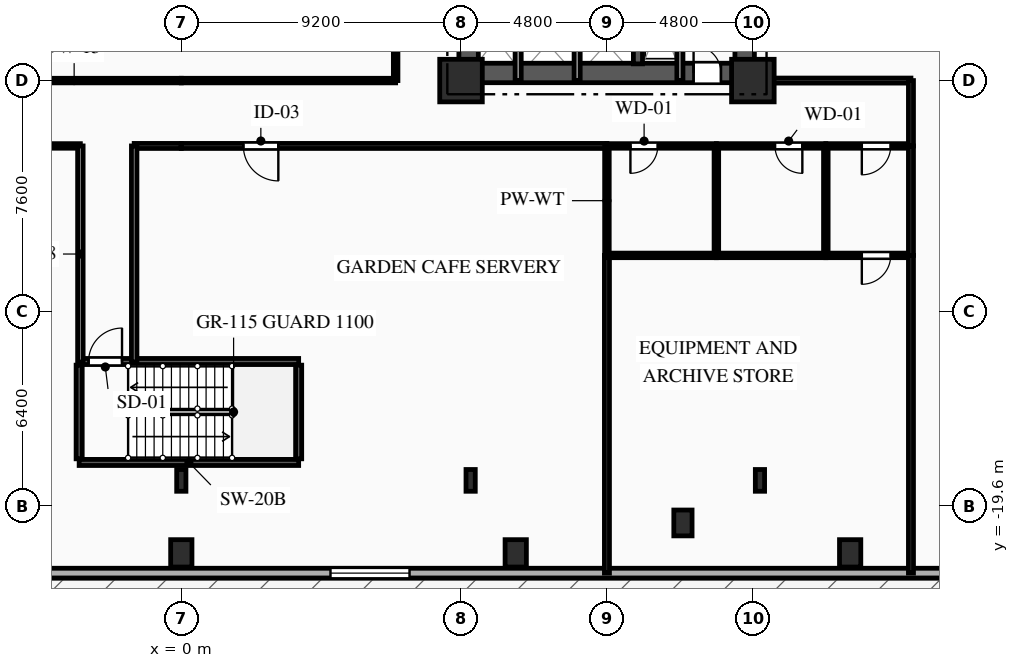
"""IFC4 building model, lengths in metres.
Left out: names, types, materials, properties, quantities, classifications, styles, units other than length and angle.
Written with IfcOpenShell. Run it as: python <this file> out.ifc"""

import sys

from ifc_helpers import new_model, si_unit, direction, frame, frame_2d, origin, origin_2d, place, context, subcontext, project, spatial, rectangle, i_section, extrude, element, fill, save


model = new_model("IFC4")
c1 = context("Model", 3, precision=1e-05, world=origin(), true_north=direction((0.0, 1.0)))
c2 = subcontext(c1, "Body", "Model", "MODEL_VIEW")
j1 = project(units=[si_unit("LENGTHUNIT", "METRE"), si_unit("PLANEANGLEUNIT", "RADIAN")], contexts=[c1])
p1 = place(None, origin())
s1 = spatial("IfcSite", under=j1, at=p1, CompositionType="ELEMENT")
p2 = place(p1, origin())
s2 = spatial("IfcBuilding", under=s1, at=p2, CompositionType="ELEMENT")
p3 = place(p2, frame((0.0, 0.0, 13.5)))
s3 = spatial("IfcBuildingStorey", under=s2, at=p3, CompositionType="ELEMENT", Elevation=13.5)
for number, where, z_axis, x_axis in (
    (1, (9.2, -5.6, 0.0), (0.0, 0.0, 1.0), (1.0, 0.0, 0.0)),
    (2, (18.8, -5.6, 0.0), (0.0, 0.0, 1.0), (1.0, 0.0, 0.0)),
):
    element("IfcColumn", number, at=place(p3, frame(where, z_axis=z_axis, x_axis=x_axis)), inside=s3, PredefinedType="COLUMN", context=c2, shape_type="SweptSolid", body=[
        extrude(rectangle(XDim=1.4, YDim=1.4, at=origin_2d()), origin(), (0.0, 0.0, 1.0), 4.5),
    ])
for number, where, z_axis, x_axis in (
    (3, (0.0, -21.15, 0.0), (0.0, 0.0, 1.0), (1.0, 0.0, 0.0)),
    (4, (11.0, -21.15, 0.0), (0.0, 0.0, 1.0), (1.0, 0.0, 0.0)),
    (5, (22.0, -21.15, 0.0), (0.0, 0.0, 1.0), (1.0, 0.0, 0.0)),
):
    element("IfcColumn", number, at=place(p3, frame(where, z_axis=z_axis, x_axis=x_axis)), inside=s3, PredefinedType="COLUMN", context=c2, shape_type="SweptSolid", body=[
        extrude(rectangle(XDim=0.7, YDim=0.9, at=origin_2d()), origin(), (0.0, 0.0, 1.0), 4.5),
    ])
p4 = place(p3, frame((16.5, -20.15, 0.0), z_axis=(0.0, 0.0, 1.0), x_axis=(1.0, 0.0, 0.0)))
e6 = element("IfcColumn", 6, at=p4, inside=s3, PredefinedType="PILASTER", context=c2, shape_type="SweptSolid", body=[
    extrude(rectangle(XDim=0.6, YDim=0.85, at=origin_2d()), origin(), (0.0, 0.0, 1.0), 4.5),
])
for number, where, z_axis, x_axis in (
    (7, (0.0, -18.75, 0.0), (0.0, 0.0, 1.0), (1.0, 0.0, 0.0)),
    (8, (9.517, -18.75, 0.0), (0.0, 0.0, 1.0), (1.0, 0.0, 0.0)),
    (9, (19.033, -18.75, 0.0), (0.0, 0.0, 1.0), (1.0, 0.0, 0.0)),
):
    element("IfcColumn", number, at=place(p3, frame(where, z_axis=z_axis, x_axis=x_axis)), inside=s3, PredefinedType="COLUMN", context=c2, shape_type="SweptSolid", body=[
        extrude(i_section(OverallWidth=0.304, OverallDepth=0.716, WebThickness=0.021, FlangeThickness=0.04, FilletRadius=0.027, at=origin_2d()), origin(), (0.0, 0.0, 1.0), 4.5),
    ])
p5 = place(p3, frame((36.8, -21.8, 0.0), z_axis=(0.0, 0.0, 1.0), x_axis=(-1.0, 0.0, 0.0)))
e10 = element("IfcWall", 10, at=p5, inside=s3, PredefinedType="SOLIDWALL", context=c2, shape_type="SweptSolid", body=[
    extrude(rectangle(XDim=73.6, YDim=0.32, at=frame_2d((36.8, 0.0))), origin(), (0.0, 0.0, 1.0), 4.17),
])
p6 = place(p5, frame((0.75, 0.0, 0.0)))
e11 = element("IfcOpeningElement", 11, at=p6, cuts=e10, PredefinedType="OPENING", context=c2, shape_type="SweptSolid", body=[
    extrude(rectangle(XDim=1.5, YDim=2.2, at=frame_2d((0.75, 1.1))), frame((0.0, 0.17, 0.0), z_axis=(0.0, -1.0, 0.0), x_axis=(1.0, 0.0, 0.0)), (0.0, 0.0, 1.0), 0.34),
])
p7 = place(p5, frame((5.347, 0.0, 0.85)))
e12 = element("IfcOpeningElement", 12, at=p7, cuts=e10, PredefinedType="OPENING", context=c2, shape_type="SweptSolid", body=[
    extrude(rectangle(XDim=2.6, YDim=2.4, at=frame_2d((1.3, 1.2))), frame((0.0, 0.17, 0.0), z_axis=(0.0, -1.0, 0.0), x_axis=(1.0, 0.0, 0.0)), (0.0, 0.0, 1.0), 0.34),
])
p8 = place(p5, frame((29.293, 0.0, 0.85)))
e13 = element("IfcOpeningElement", 13, at=p8, cuts=e10, PredefinedType="OPENING", context=c2, shape_type="SweptSolid", body=[
    extrude(rectangle(XDim=2.6, YDim=2.4, at=frame_2d((1.3, 1.2))), frame((0.0, 0.17, 0.0), z_axis=(0.0, -1.0, 0.0), x_axis=(1.0, 0.0, 0.0)), (0.0, 0.0, 1.0), 0.34),
])
p9 = place(p5, frame((49.195, 0.0, 0.85)))
e14 = element("IfcOpeningElement", 14, at=p9, cuts=e10, PredefinedType="OPENING", context=c2, shape_type="SweptSolid", body=[
    extrude(rectangle(XDim=2.6, YDim=2.4, at=frame_2d((1.3, 1.2))), frame((0.0, 0.17, 0.0), z_axis=(0.0, -1.0, 0.0), x_axis=(1.0, 0.0, 0.0)), (0.0, 0.0, 1.0), 0.34),
])
p10 = place(p5, frame((65.733, 0.0, 0.85)))
e15 = element("IfcOpeningElement", 15, at=p10, cuts=e10, PredefinedType="OPENING", context=c2, shape_type="SweptSolid", body=[
    extrude(rectangle(XDim=2.6, YDim=2.4, at=frame_2d((1.3, 1.2))), frame((0.0, 0.17, 0.0), z_axis=(0.0, -1.0, 0.0), x_axis=(1.0, 0.0, 0.0)), (0.0, 0.0, 1.0), 0.34),
])
p11 = place(p3, frame((9.2, -5.35, 0.0), z_axis=(0.0, 0.0, 1.0), x_axis=(1.0, 0.0, 0.0)))
e16 = element("IfcWall", 16, at=p11, inside=s3, PredefinedType="SHEAR", context=c2, shape_type="SweptSolid", body=[
    extrude(rectangle(XDim=9.6, YDim=0.64, at=frame_2d((4.8, 0.0))), origin(), (0.0, 0.0, 1.0), 4.17),
])
p12 = place(p11, frame((7.65, 0.0, 0.0)))
e17 = element("IfcOpeningElement", 17, at=p12, cuts=e16, PredefinedType="OPENING", context=c2, shape_type="SweptSolid", body=[
    extrude(rectangle(XDim=0.9, YDim=2.1, at=frame_2d((0.45, 1.05))), frame((0.0, 0.33, 0.0), z_axis=(0.0, -1.0, 0.0), x_axis=(1.0, 0.0, 0.0)), (0.0, 0.0, 1.0), 0.66),
])
p13 = place(p3, frame((9.45, -5.05, 0.0), z_axis=(0.0, 0.0, 1.0), x_axis=(0.0, 1.0, 0.0)))
e18 = element("IfcWall", 18, at=p13, inside=s3, PredefinedType="SHEAR", context=c2, shape_type="SweptSolid", body=[
    extrude(rectangle(XDim=10.1, YDim=0.64, at=frame_2d((5.05, 0.0))), origin(), (0.0, 0.0, 1.0), 4.17),
])
p14 = place(p13, frame((7.15, 0.0, 0.0)))
e19 = element("IfcOpeningElement", 19, at=p14, cuts=e18, PredefinedType="OPENING", context=c2, shape_type="SweptSolid", body=[
    extrude(rectangle(XDim=0.9, YDim=2.1, at=frame_2d((0.45, 1.05))), frame((0.0, 0.33, 0.0), z_axis=(0.0, -1.0, 0.0), x_axis=(1.0, 0.0, 0.0)), (0.0, 0.0, 1.0), 0.66),
])
p15 = place(p13, frame((2.4, 0.0, 0.0)))
e20 = element("IfcOpeningElement", 20, at=p15, cuts=e18, PredefinedType="OPENING", context=c2, shape_type="SweptSolid", body=[
    extrude(rectangle(XDim=1.2, YDim=2.15, at=frame_2d((0.6, 1.075))), frame((0.0, 0.33, 0.0), z_axis=(0.0, -1.0, 0.0), x_axis=(1.0, 0.0, 0.0)), (0.0, 0.0, 1.0), 0.66),
])
p16 = place(p3, frame((18.53, -5.05, 0.0), z_axis=(0.0, 0.0, 1.0), x_axis=(0.0, 1.0, 0.0)))
e21 = element("IfcWall", 21, at=p16, inside=s3, PredefinedType="SHEAR", context=c2, shape_type="SweptSolid", body=[
    extrude(rectangle(XDim=10.1, YDim=0.64, at=frame_2d((5.05, 0.0))), origin(), (0.0, 0.0, 1.0), 4.17),
])
p17 = place(p3, frame((15.02, -5.05, 0.0), z_axis=(0.0, 0.0, 1.0), x_axis=(0.0, 1.0, 0.0)))
e22 = element("IfcWall", 22, at=p17, inside=s3, PredefinedType="SHEAR", context=c2, shape_type="SweptSolid", body=[
    extrude(rectangle(XDim=10.1, YDim=0.3, at=frame_2d((5.05, 0.0))), origin(), (0.0, 0.0, 1.0), 4.17),
])
p18 = place(p3, frame((-3.36, -14.84, 0.0), z_axis=(0.0, 0.0, 1.0), x_axis=(1.0, 0.0, 0.0)))
e23 = element("IfcWall", 23, at=p18, inside=s3, PredefinedType="SHEAR", context=c2, shape_type="SweptSolid", body=[
    extrude(rectangle(XDim=7.22, YDim=0.2, at=frame_2d((3.61, 0.0))), origin(), (0.0, 0.0, 1.0), 4.17),
])
p19 = place(p18, frame((0.31, 0.0, 0.0)))
e24 = element("IfcOpeningElement", 24, at=p19, cuts=e23, PredefinedType="OPENING", context=c2, shape_type="SweptSolid", body=[
    extrude(rectangle(XDim=1.1, YDim=2.15, at=frame_2d((0.55, 1.075))), frame((0.0, 0.11, 0.0), z_axis=(0.0, -1.0, 0.0), x_axis=(1.0, 0.0, 0.0)), (0.0, 0.0, 1.0), 0.22),
])
p20 = place(p3, frame((-3.36, -18.16, 0.0), z_axis=(0.0, 0.0, 1.0), x_axis=(1.0, 0.0, 0.0)))
e25 = element("IfcWall", 25, at=p20, inside=s3, PredefinedType="SHEAR", context=c2, shape_type="SweptSolid", body=[
    extrude(rectangle(XDim=7.22, YDim=0.2, at=frame_2d((3.61, 0.0))), origin(), (0.0, 0.0, 1.0), 4.17),
])
for number, where, z_axis, x_axis in (
    (26, (-3.36, -18.04, 0.0), (0.0, 0.0, 1.0), (0.0, 1.0, 0.0)),
    (27, (3.86, -18.04, 0.0), (0.0, 0.0, 1.0), (0.0, 1.0, 0.0)),
):
    element("IfcWall", number, at=place(p3, frame(where, z_axis=z_axis, x_axis=x_axis)), inside=s3, PredefinedType="SHEAR", context=c2, shape_type="SweptSolid", body=[
        extrude(rectangle(XDim=3.08, YDim=0.2, at=frame_2d((1.54, 0.0))), origin(), (0.0, 0.0, 1.0), 4.17),
    ])
p21 = place(p3, frame((16.4, -2.11, 0.0), z_axis=(0.0, 0.0, 1.0), x_axis=(0.0, -1.0, 0.0)))
e28 = element("IfcWall", 28, at=p21, inside=s3, PredefinedType="PARTITIONING", context=c2, shape_type="SweptSolid", body=[
    extrude(rectangle(XDim=3.49, YDim=0.2, at=frame_2d((1.745, 0.0))), origin(), (0.0, 0.0, 1.0), 4.17),
])
for number, where, z_axis, x_axis in (
    (29, (11.08, -5.6, 0.0), (0.0, 0.0, 1.0), (0.0, 1.0, 0.0)),
    (30, (13.02, -5.6, 0.0), (0.0, 0.0, 1.0), (0.0, 1.0, 0.0)),
):
    element("IfcWall", number, at=place(p3, frame(where, z_axis=z_axis, x_axis=x_axis)), inside=s3, PredefinedType="PARTITIONING", context=c2, shape_type="SweptSolid", body=[
        extrude(rectangle(XDim=2.25, YDim=0.2, at=frame_2d((1.125, 0.0))), origin(), (0.0, 0.0, 1.0), 4.17),
    ])
p22 = place(p3, frame((-3.32, -7.75, 0.0), z_axis=(0.0, 0.0, 1.0), x_axis=(-1.0, 0.0, 0.0)))
e31 = element("IfcWall", 31, at=p22, inside=s3, PredefinedType="PARTITIONING", context=c2, shape_type="SweptSolid", body=[
    extrude(rectangle(XDim=20.68, YDim=0.15, at=frame_2d((10.34, 0.0))), origin(), (0.0, 0.0, 1.0), 4.17),
])
p23 = place(p22, frame((9.815, 0.0, 0.0)))
e32 = element("IfcOpeningElement", 32, at=p23, cuts=e31, PredefinedType="OPENING", context=c2, shape_type="SweptSolid", body=[
    extrude(rectangle(XDim=1.05, YDim=2.15, at=frame_2d((0.525, 1.075))), frame((0.0, 0.085, 0.0), z_axis=(0.0, -1.0, 0.0), x_axis=(1.0, 0.0, 0.0)), (0.0, 0.0, 1.0), 0.17),
])
p24 = place(p3, frame((0.0, -7.75, 0.0), z_axis=(0.0, 0.0, 1.0), x_axis=(-1.0, 0.0, 0.0)))
e33 = element("IfcWall", 33, at=p24, inside=s3, PredefinedType="PARTITIONING", context=c2, shape_type="SweptSolid", body=[
    extrude(rectangle(XDim=1.55, YDim=0.165, at=frame_2d((0.775, 0.0))), origin(), (0.0, 0.0, 1.0), 4.17),
])
p25 = place(p3, frame((-7.05, -5.6, 0.0), z_axis=(0.0, 0.0, 1.0), x_axis=(1.0, 0.0, 0.0)))
e34 = element("IfcWall", 34, at=p25, inside=s3, PredefinedType="PARTITIONING", context=c2, shape_type="SweptSolid", body=[
    extrude(rectangle(XDim=7.05, YDim=0.15, at=frame_2d((3.525, 0.0))), origin(), (0.0, 0.0, 1.0), 3.655),
])
p26 = place(p3, frame((14.0, -7.75, 0.0), z_axis=(0.0, 0.0, 1.0), x_axis=(-1.0, 0.0, 0.0)))
e35 = element("IfcWall", 35, at=p26, inside=s3, PredefinedType="PARTITIONING", context=c2, shape_type="SweptSolid", body=[
    extrude(rectangle(XDim=14.0, YDim=0.165, at=frame_2d((7.0, 0.0))), origin(), (0.0, 0.0, 1.0), 4.17),
])
p27 = place(p26, frame((10.809, 0.0, 0.0)))
e36 = element("IfcOpeningElement", 36, at=p27, cuts=e35, PredefinedType="OPENING", context=c2, shape_type="SweptSolid", body=[
    extrude(rectangle(XDim=1.15, YDim=2.15, at=frame_2d((0.575, 1.075))), frame((0.0, 0.093, 0.0), z_axis=(0.0, -1.0, 0.0), x_axis=(1.0, 0.0, 0.0)), (0.0, 0.0, 1.0), 0.185),
])
p28 = place(p3, frame((17.6, -7.75, 0.0), z_axis=(0.0, 0.0, 1.0), x_axis=(-1.0, 0.0, 0.0)))
e37 = element("IfcWall", 37, at=p28, inside=s3, PredefinedType="PLUMBINGWALL", context=c2, shape_type="SweptSolid", body=[
    extrude(rectangle(XDim=3.6, YDim=0.15, at=frame_2d((1.8, 0.0))), origin(), (0.0, 0.0, 1.0), 4.17),
])
p29 = place(p28, frame((1.927, 0.0, 0.0)))
e38 = element("IfcOpeningElement", 38, at=p29, cuts=e37, PredefinedType="OPENING", context=c2, shape_type="SweptSolid", body=[
    extrude(rectangle(XDim=0.9, YDim=2.1, at=frame_2d((0.45, 1.05))), frame((0.0, 0.085, 0.0), z_axis=(0.0, -1.0, 0.0), x_axis=(1.0, 0.0, 0.0)), (0.0, 0.0, 1.0), 0.17),
])
p30 = place(p3, frame((21.2, -7.75, 0.0), z_axis=(0.0, 0.0, 1.0), x_axis=(-1.0, 0.0, 0.0)))
e39 = element("IfcWall", 39, at=p30, inside=s3, PredefinedType="PLUMBINGWALL", context=c2, shape_type="SweptSolid", body=[
    extrude(rectangle(XDim=3.6, YDim=0.15, at=frame_2d((1.8, 0.0))), origin(), (0.0, 0.0, 1.0), 4.17),
])
p31 = place(p30, frame((0.772, 0.0, 0.0)))
e40 = element("IfcOpeningElement", 40, at=p31, cuts=e39, PredefinedType="OPENING", context=c2, shape_type="SweptSolid", body=[
    extrude(rectangle(XDim=0.9, YDim=2.1, at=frame_2d((0.45, 1.05))), frame((0.0, 0.085, 0.0), z_axis=(0.0, -1.0, 0.0), x_axis=(1.0, 0.0, 0.0)), (0.0, 0.0, 1.0), 0.17),
])
p32 = place(p3, frame((24.0, -7.75, 0.0), z_axis=(0.0, 0.0, 1.0), x_axis=(-1.0, 0.0, 0.0)))
e41 = element("IfcWall", 41, at=p32, inside=s3, PredefinedType="PARTITIONING", context=c2, shape_type="SweptSolid", body=[
    extrude(rectangle(XDim=2.8, YDim=0.15, at=frame_2d((1.4, 0.0))), origin(), (0.0, 0.0, 1.0), 4.17),
])
p33 = place(p32, frame((0.666, 0.0, 0.0)))
e42 = element("IfcOpeningElement", 42, at=p33, cuts=e41, PredefinedType="OPENING", context=c2, shape_type="SweptSolid", body=[
    extrude(rectangle(XDim=0.95, YDim=2.1, at=frame_2d((0.475, 1.05))), frame((0.0, 0.085, 0.0), z_axis=(0.0, -1.0, 0.0), x_axis=(1.0, 0.0, 0.0)), (0.0, 0.0, 1.0), 0.17),
])
p34 = place(p3, frame((0.0, -5.6, 0.0), z_axis=(0.0, 0.0, 1.0), x_axis=(1.0, 0.0, 0.0)))
e43 = element("IfcWall", 43, at=p34, inside=s3, PredefinedType="PARTITIONING", context=c2, shape_type="SweptSolid", body=[
    extrude(rectangle(XDim=7.05, YDim=0.15, at=frame_2d((3.525, 0.0))), origin(), (0.0, 0.0, 1.0), 3.655),
])
p35 = place(p3, frame((18.8, -5.6, 0.0), z_axis=(0.0, 0.0, 1.0), x_axis=(1.0, 0.0, 0.0)))
e44 = element("IfcWall", 44, at=p35, inside=s3, PredefinedType="PARTITIONING", context=c2, shape_type="SweptSolid", body=[
    extrude(rectangle(XDim=5.2, YDim=0.165, at=frame_2d((2.6, 0.0))), origin(), (0.0, 0.0, 1.0), 4.17),
])
p36 = place(p3, frame((24.0, -5.6, 0.0), z_axis=(0.0, 0.0, 1.0), x_axis=(0.0, -1.0, 0.0)))
e45 = element("IfcWall", 45, at=p36, inside=s3, PredefinedType="PARTITIONING", context=c2, shape_type="SweptSolid", body=[
    extrude(rectangle(XDim=2.15, YDim=0.165, at=frame_2d((1.075, 0.0))), origin(), (0.0, 0.0, 1.0), 4.17),
])
p37 = place(p3, frame((7.05, -5.6, 0.0), z_axis=(0.0, 0.0, 1.0), x_axis=(0.0, 1.0, 0.0)))
e46 = element("IfcWall", 46, at=p37, inside=s3, PredefinedType="PARTITIONING", context=c2, shape_type="SweptSolid", body=[
    extrude(rectangle(XDim=14.1, YDim=0.15, at=frame_2d((7.05, 0.0))), origin(), (0.0, 0.0, 1.0), 4.17),
])
for number, where, z_axis, x_axis in (
    (47, (-3.32, -14.86, 0.0), (0.0, 0.0, 1.0), (0.0, 1.0, 0.0)),
    (48, (-1.55, -7.75, 0.0), (0.0, 0.0, 1.0), (0.0, -1.0, 0.0)),
):
    element("IfcWall", number, at=place(p3, frame(where, z_axis=z_axis, x_axis=x_axis)), inside=s3, PredefinedType="PARTITIONING", context=c2, shape_type="SweptSolid", body=[
        extrude(rectangle(XDim=7.11, YDim=0.18, at=frame_2d((3.555, 0.0))), origin(), (0.0, 0.0, 1.0), 4.17),
    ])
p38 = place(p3, frame((14.0, -7.75, 0.0), z_axis=(0.0, 0.0, 1.0), x_axis=(0.0, -1.0, 0.0)))
e49 = element("IfcWall", 49, at=p38, inside=s3, PredefinedType="PLUMBINGWALL", context=c2, shape_type="SweptSolid", body=[
    extrude(rectangle(XDim=3.6, YDim=0.15, at=frame_2d((1.8, 0.0))), origin(), (0.0, 0.0, 1.0), 4.17),
])
p39 = place(p3, frame((14.0, -11.35, 0.0), z_axis=(0.0, 0.0, 1.0), x_axis=(0.0, -1.0, 0.0)))
e50 = element("IfcWall", 50, at=p39, inside=s3, PredefinedType="PARTITIONING", context=c2, shape_type="SweptSolid", body=[
    extrude(rectangle(XDim=10.45, YDim=0.165, at=frame_2d((5.225, 0.0))), origin(), (0.0, 0.0, 1.0), 4.17),
])
for number, where, z_axis, x_axis in (
    (51, (17.6, -7.75, 0.0), (0.0, 0.0, 1.0), (0.0, -1.0, 0.0)),
    (52, (17.6, -11.35, 0.0), (0.0, 0.0, 1.0), (-1.0, 0.0, 0.0)),
    (53, (21.2, -7.75, 0.0), (0.0, 0.0, 1.0), (0.0, -1.0, 0.0)),
):
    element("IfcWall", number, at=place(p3, frame(where, z_axis=z_axis, x_axis=x_axis)), inside=s3, PredefinedType="PLUMBINGWALL", context=c2, shape_type="SweptSolid", body=[
        extrude(rectangle(XDim=3.6, YDim=0.15, at=frame_2d((1.8, 0.0))), origin(), (0.0, 0.0, 1.0), 4.17),
    ])
p40 = place(p3, frame((21.2, -11.35, 0.0), z_axis=(0.0, 0.0, 1.0), x_axis=(-1.0, 0.0, 0.0)))
e54 = element("IfcWall", 54, at=p40, inside=s3, PredefinedType="PLUMBINGWALL", context=c2, shape_type="SweptSolid", body=[
    extrude(rectangle(XDim=3.6, YDim=0.15, at=frame_2d((1.8, 0.0))), origin(), (0.0, 0.0, 1.0), 4.17),
])
p41 = place(p3, frame((24.0, -11.35, 0.0), z_axis=(0.0, 0.0, 1.0), x_axis=(-1.0, 0.0, 0.0)))
e55 = element("IfcWall", 55, at=p41, inside=s3, PredefinedType="PARTITIONING", context=c2, shape_type="SweptSolid", body=[
    extrude(rectangle(XDim=2.8, YDim=0.15, at=frame_2d((1.4, 0.0))), origin(), (0.0, 0.0, 1.0), 4.17),
])
p42 = place(p41, frame((0.666, 0.0, 0.0)))
e56 = element("IfcOpeningElement", 56, at=p42, cuts=e55, PredefinedType="OPENING", context=c2, shape_type="SweptSolid", body=[
    extrude(rectangle(XDim=0.95, YDim=2.1, at=frame_2d((0.475, 1.05))), frame((0.0, 0.085, 0.0), z_axis=(0.0, -1.0, 0.0), x_axis=(1.0, 0.0, 0.0)), (0.0, 0.0, 1.0), 0.17),
])
p43 = place(p3, frame((24.0, -7.75, 0.0), z_axis=(0.0, 0.0, 1.0), x_axis=(0.0, -1.0, 0.0)))
e57 = element("IfcWall", 57, at=p43, inside=s3, PredefinedType="PARTITIONING", context=c2, shape_type="SweptSolid", body=[
    extrude(rectangle(XDim=3.6, YDim=0.165, at=frame_2d((1.8, 0.0))), origin(), (0.0, 0.0, 1.0), 4.17),
])
p44 = place(p3, frame((24.0, -11.35, 0.0), z_axis=(0.0, 0.0, 1.0), x_axis=(0.0, -1.0, 0.0)))
e58 = element("IfcWall", 58, at=p44, inside=s3, PredefinedType="PARTITIONING", context=c2, shape_type="SweptSolid", body=[
    extrude(rectangle(XDim=10.45, YDim=0.165, at=frame_2d((5.225, 0.0))), origin(), (0.0, 0.0, 1.0), 4.17),
])
p45 = place(p8, origin())
e59 = element("IfcWindow", 59, at=p45, inside=s3, PartitioningType="SINGLE_PANEL", PredefinedType="WINDOW", context=c2, shape_type="SweptSolid", body=[
    extrude(rectangle(XDim=2.6, YDim=2.4, at=frame_2d((1.3, 1.2))), frame((0.0, 0.03, 0.0), z_axis=(0.0, -1.0, 0.0), x_axis=(1.0, 0.0, 0.0)), (0.0, 0.0, 1.0), 0.06),
])
fill(e13, e59)
p46 = place(p12, origin())
e60 = element("IfcDoor", 60, at=p46, inside=s3, OperationType="SINGLE_SWING_LEFT", PredefinedType="DOOR", context=c2, shape_type="SweptSolid", body=[
    extrude(rectangle(XDim=0.9, YDim=2.1, at=frame_2d((0.45, 1.05))), frame((0.0, 0.025, 0.0), z_axis=(0.0, -1.0, 0.0), x_axis=(1.0, 0.0, 0.0)), (0.0, 0.0, 1.0), 0.05),
])
fill(e17, e60)
p47 = place(p19, origin())
e61 = element("IfcDoor", 61, at=p47, inside=s3, OperationType="SINGLE_SWING_RIGHT", PredefinedType="DOOR", context=c2, shape_type="SweptSolid", body=[
    extrude(rectangle(XDim=1.1, YDim=2.15, at=frame_2d((0.55, 1.075))), frame((0.0, 0.025, 0.0), z_axis=(0.0, -1.0, 0.0), x_axis=(1.0, 0.0, 0.0)), (0.0, 0.0, 1.0), 0.05),
])
fill(e24, e61)
p48 = place(p27, origin())
e62 = element("IfcDoor", 62, at=p48, inside=s3, OperationType="SINGLE_SWING_LEFT", PredefinedType="DOOR", context=c2, shape_type="SweptSolid", body=[
    extrude(rectangle(XDim=1.15, YDim=2.15, at=frame_2d((0.575, 1.075))), frame((0.0, 0.025, 0.0), z_axis=(0.0, -1.0, 0.0), x_axis=(1.0, 0.0, 0.0)), (0.0, 0.0, 1.0), 0.05),
])
fill(e36, e62)
p49 = place(p29, origin())
e63 = element("IfcDoor", 63, at=p49, inside=s3, OperationType="SINGLE_SWING_RIGHT", PredefinedType="DOOR", context=c2, shape_type="SweptSolid", body=[
    extrude(rectangle(XDim=0.9, YDim=2.1, at=frame_2d((0.45, 1.05))), frame((0.0, 0.025, 0.0), z_axis=(0.0, -1.0, 0.0), x_axis=(1.0, 0.0, 0.0)), (0.0, 0.0, 1.0), 0.05),
])
fill(e38, e63)
p50 = place(p31, origin())
e64 = element("IfcDoor", 64, at=p50, inside=s3, OperationType="SINGLE_SWING_LEFT", PredefinedType="DOOR", context=c2, shape_type="SweptSolid", body=[
    extrude(rectangle(XDim=0.9, YDim=2.1, at=frame_2d((0.45, 1.05))), frame((0.0, 0.025, 0.0), z_axis=(0.0, -1.0, 0.0), x_axis=(1.0, 0.0, 0.0)), (0.0, 0.0, 1.0), 0.05),
])
fill(e40, e64)
p51 = place(p33, origin())
e65 = element("IfcDoor", 65, at=p51, inside=s3, OperationType="SINGLE_SWING_RIGHT", PredefinedType="DOOR", context=c2, shape_type="SweptSolid", body=[
    extrude(rectangle(XDim=0.95, YDim=2.1, at=frame_2d((0.475, 1.05))), frame((0.0, 0.025, 0.0), z_axis=(0.0, -1.0, 0.0), x_axis=(1.0, 0.0, 0.0)), (0.0, 0.0, 1.0), 0.05),
])
fill(e42, e65)
p52 = place(p42, origin())
e66 = element("IfcDoor", 66, at=p52, inside=s3, OperationType="SINGLE_SWING_RIGHT", PredefinedType="DOOR", context=c2, shape_type="SweptSolid", body=[
    extrude(rectangle(XDim=0.95, YDim=2.1, at=frame_2d((0.475, 1.05))), frame((0.0, 0.025, 0.0), z_axis=(0.0, -1.0, 0.0), x_axis=(1.0, 0.0, 0.0)), (0.0, 0.0, 1.0), 0.05),
])
fill(e56, e66)
save(model, sys.argv[1])
